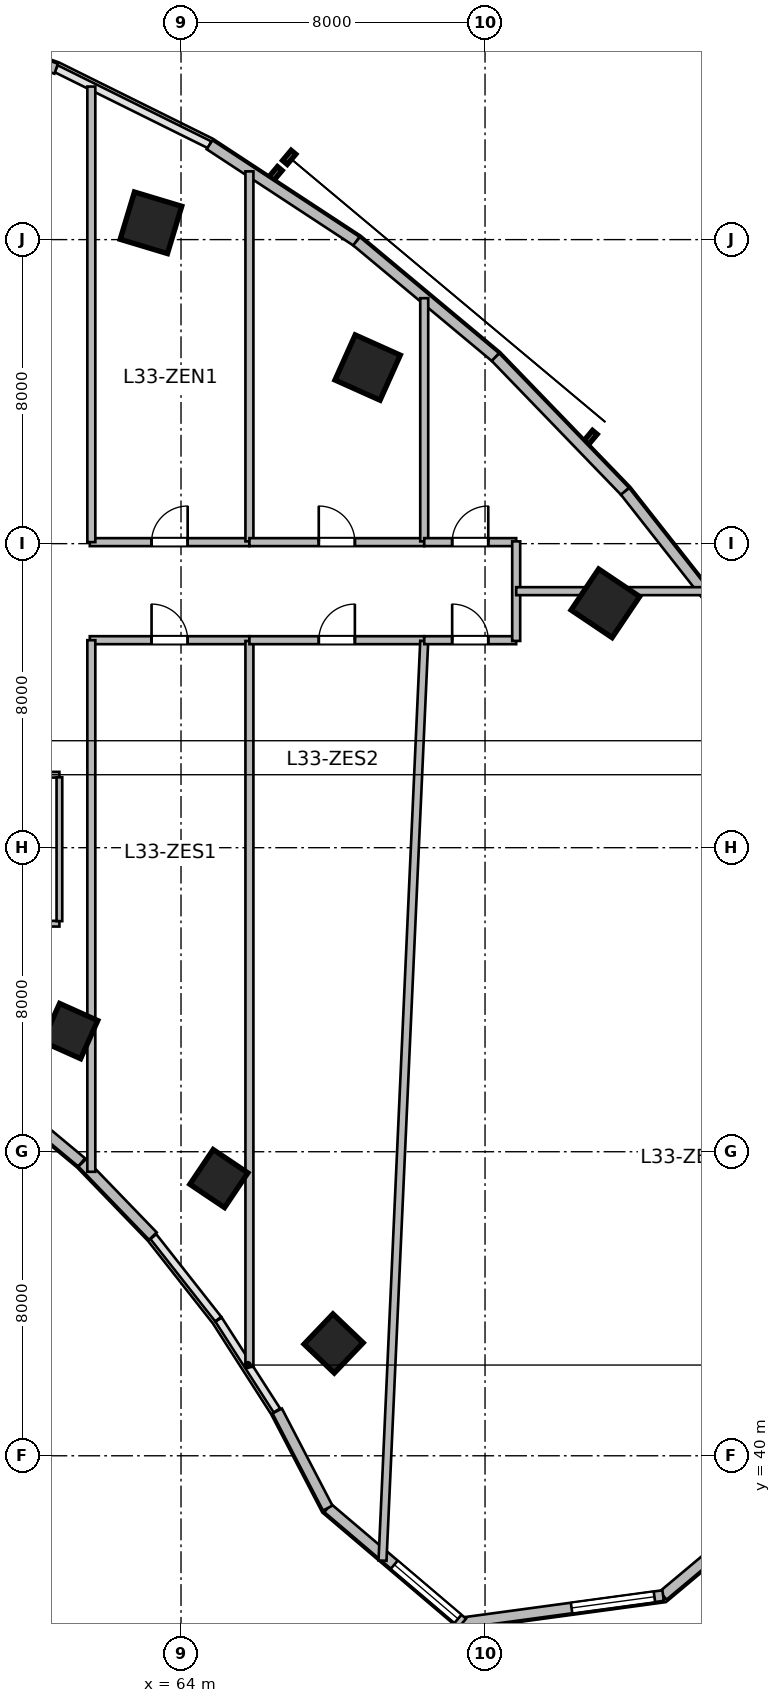
"""IFC4 building model, lengths in metres.
Left out: names, types, materials, properties, quantities, classifications, styles, units other than length and angle.
Written with IfcOpenShell. Run it as: python <this file> out.ifc"""

import sys

from ifc_helpers import new_model, si_unit, direction, frame, frame_2d, origin, origin_2d, place, context, subcontext, project, spatial, rectangle, extrude, source, transform, mapped, element, fill, save


model = new_model("IFC4")
c1 = context("Model", 3, precision=1e-05, world=origin(), true_north=direction((0.0, 1.0)))
c2 = subcontext(c1, "Body", "Model", "MODEL_VIEW")
j1 = project(units=[si_unit("LENGTHUNIT", "METRE"), si_unit("PLANEANGLEUNIT", "RADIAN")], contexts=[c1])
p1 = place(None, origin())
s1 = spatial("IfcSite", under=j1, at=p1, CompositionType="ELEMENT")
p2 = place(p1, origin())
s2 = spatial("IfcBuilding", under=s1, at=p2, CompositionType="ELEMENT")
p3 = place(p2, frame((0.0, 0.0, 138.9)))
s3 = spatial("IfcBuildingStorey", under=s2, at=p3, CompositionType="ELEMENT", Elevation=138.9)
m1 = source(origin(), c2, "Body", "SweptSolid", [
    extrude(rectangle(XDim=1.3, YDim=1.3, at=origin_2d()), origin(), (0.0, 0.0, 1.0), 3.9),
])
p4 = place(p3, frame((63.209, 72.442, 0.0), z_axis=(0.0, 0.0, 1.0), x_axis=(0.288697611798, 0.957420330337, 0.0)))
e1 = element("IfcColumn", 1, at=p4, inside=s3, PredefinedType="COLUMN", context=c2, shape_type="MappedRepresentation", body=[
    mapped(m1, transform((0.0, 0.0, 0.0), scale=1.0)),
])
m2 = source(origin(), c2, "Body", "SweptSolid", [
    extrude(rectangle(XDim=1.1, YDim=1.1, at=origin_2d()), origin(), (0.0, 0.0, 1.0), 3.9),
])
p5 = place(p3, frame((61.082, 51.175, 0.0), z_axis=(0.0, 0.0, 1.0), x_axis=(0.409126902895, 0.912477494148, 0.0)))
e2 = element("IfcColumn", 2, at=p5, inside=s3, PredefinedType="COLUMN", context=c2, shape_type="MappedRepresentation", body=[
    mapped(m2, transform((0.0, 0.0, 0.0), scale=1.0)),
])
p6 = place(p3, frame((68.91, 68.633, 0.0), z_axis=(0.0, 0.0, 1.0), x_axis=(0.409126902895, 0.912477494148, 0.0)))
e3 = element("IfcColumn", 3, at=p6, inside=s3, PredefinedType="COLUMN", context=c2, shape_type="MappedRepresentation", body=[
    mapped(m1, transform((0.0, 0.0, 0.0), scale=1.0)),
])
p7 = place(p3, frame((64.996, 47.294, 0.0), z_axis=(0.0, 0.0, 1.0), x_axis=(0.55774510898, 0.830012285095, 0.0)))
e4 = element("IfcColumn", 4, at=p7, inside=s3, PredefinedType="COLUMN", context=c2, shape_type="MappedRepresentation", body=[
    mapped(m2, transform((0.0, 0.0, 0.0), scale=1.0)),
])
p8 = place(p3, frame((75.167, 62.43, 0.0), z_axis=(0.0, 0.0, 1.0), x_axis=(0.55774510898, 0.830012285095, 0.0)))
e5 = element("IfcColumn", 5, at=p8, inside=s3, PredefinedType="COLUMN", context=c2, shape_type="MappedRepresentation", body=[
    mapped(m1, transform((0.0, 0.0, 0.0), scale=1.0)),
])
p9 = place(p3, frame((68.015, 42.955, 0.0), z_axis=(0.0, 0.0, 1.0), x_axis=(0.690756218984, 0.723087716626, 0.0)))
e6 = element("IfcColumn", 6, at=p9, inside=s3, PredefinedType="COLUMN", context=c2, shape_type="MappedRepresentation", body=[
    mapped(m2, transform((0.0, 0.0, 0.0), scale=1.0)),
])
m3 = source(origin(), c2, "Body", "SweptSolid", [
    extrude(rectangle(XDim=6.573, YDim=0.28, at=frame_2d((3.287, 0.0))), origin(), (0.0, 0.0, 1.0), 3.65),
])
p10 = place(p3, frame((81.725, 40.541, 0.0), z_axis=(0.0, 0.0, 1.0), x_axis=(-0.766715154163, -0.641987439423, 0.0)))
e7 = element("IfcWall", 7, at=p10, inside=s3, PredefinedType="SOLIDWALL", context=c2, shape_type="MappedRepresentation", body=[
    mapped(m3, transform((0.0, 0.0, 0.0), scale=1.0)),
])
p11 = place(p10, frame((0.543, 0.0, 0.95)))
e8 = element("IfcOpeningElement", 8, at=p11, cuts=e7, PredefinedType="OPENING", context=c2, shape_type="SweptSolid", body=[
    extrude(rectangle(XDim=2.2, YDim=2.1, at=frame_2d((1.1, 1.05))), frame((0.0, 0.15, 0.0), z_axis=(0.0, -1.0, 0.0), x_axis=(1.0, 0.0, 0.0)), (0.0, 0.0, 1.0), 0.3),
])
m4 = source(origin(), c2, "Body", "SweptSolid", [
    extrude(rectangle(XDim=5.324, YDim=0.28, at=frame_2d((2.662, 0.0))), origin(), (0.0, 0.0, 1.0), 3.65),
])
p12 = place(p3, frame((76.686, 36.322, 0.0), z_axis=(0.0, 0.0, 1.0), x_axis=(-0.990931467223, -0.134368252451, 0.0)))
e9 = element("IfcWall", 9, at=p12, inside=s3, PredefinedType="SOLIDWALL", context=c2, shape_type="MappedRepresentation", body=[
    mapped(m4, transform((0.0, 0.0, 0.0), scale=1.0)),
])
p13 = place(p12, frame((0.231, 0.0, 0.95)))
e10 = element("IfcOpeningElement", 10, at=p13, cuts=e9, PredefinedType="OPENING", context=c2, shape_type="SweptSolid", body=[
    extrude(rectangle(XDim=2.2, YDim=2.1, at=frame_2d((1.1, 1.05))), frame((0.0, 0.15, 0.0), z_axis=(0.0, -1.0, 0.0), x_axis=(1.0, 0.0, 0.0)), (0.0, 0.0, 1.0), 0.3),
])
m5 = source(origin(), c2, "Body", "SweptSolid", [
    extrude(rectangle(XDim=4.659, YDim=0.28, at=frame_2d((2.33, 0.0))), origin(), (0.0, 0.0, 1.0), 3.65),
])
p14 = place(p3, frame((71.41, 35.606, 0.0), z_axis=(0.0, 0.0, 1.0), x_axis=(-0.761913458795, 0.647678841176, 0.0)))
e11 = element("IfcWall", 11, at=p14, inside=s3, PredefinedType="SOLIDWALL", context=c2, shape_type="MappedRepresentation", body=[
    mapped(m5, transform((0.0, 0.0, 0.0), scale=1.0)),
])
p15 = place(p14, frame((0.16, 0.0, 0.95)))
e12 = element("IfcOpeningElement", 12, at=p15, cuts=e11, PredefinedType="OPENING", context=c2, shape_type="SweptSolid", body=[
    extrude(rectangle(XDim=2.2, YDim=2.1, at=frame_2d((1.1, 1.05))), frame((0.0, 0.15, 0.0), z_axis=(0.0, -1.0, 0.0), x_axis=(1.0, 0.0, 0.0)), (0.0, 0.0, 1.0), 0.3),
])
m6 = source(origin(), c2, "Body", "SweptSolid", [
    extrude(rectangle(XDim=2.88, YDim=0.28, at=frame_2d((1.44, 0.0))), origin(), (0.0, 0.0, 1.0), 3.65),
])
p16 = place(p3, frame((67.861, 38.624, 0.0), z_axis=(0.0, 0.0, 1.0), x_axis=(-0.461769086658, 0.887000175088, 0.0)))
e13 = element("IfcWall", 13, at=p16, inside=s3, PredefinedType="SOLIDWALL", context=c2, shape_type="MappedRepresentation", body=[
    mapped(m6, transform((0.0, 0.0, 0.0), scale=1.0)),
])
m7 = source(origin(), c2, "Body", "SweptSolid", [
    extrude(rectangle(XDim=2.68, YDim=0.28, at=frame_2d((1.34, 0.0))), origin(), (0.0, 0.0, 1.0), 3.65),
])
p17 = place(p3, frame((63.26, 45.78, 0.0), z_axis=(0.0, 0.0, 1.0), x_axis=(-0.694561996568, 0.719432855049, 0.0)))
e14 = element("IfcWall", 14, at=p17, inside=s3, PredefinedType="SOLIDWALL", context=c2, shape_type="MappedRepresentation", body=[
    mapped(m7, transform((0.0, 0.0, 0.0), scale=1.0)),
])
m8 = source(origin(), c2, "Body", "SweptSolid", [
    extrude(rectangle(XDim=2.601, YDim=0.28, at=frame_2d((1.3, 0.0))), origin(), (0.0, 0.0, 1.0), 3.65),
])
p18 = place(p3, frame((61.385, 47.721, 0.0), z_axis=(0.0, 0.0, 1.0), x_axis=(-0.76796730295, 0.640489048775, 0.0)))
e15 = element("IfcWall", 15, at=p18, inside=s3, PredefinedType="SOLIDWALL", context=c2, shape_type="MappedRepresentation", body=[
    mapped(m8, transform((0.0, 0.0, 0.0), scale=1.0)),
])
m9 = source(origin(), c2, "Body", "SweptSolid", [
    extrude(rectangle(XDim=4.409, YDim=0.28, at=frame_2d((2.205, 0.0))), origin(), (0.0, 0.0, 1.0), 3.65),
])
p19 = place(p3, frame((56.548, 77.941, 0.0), z_axis=(0.0, 0.0, 1.0), x_axis=(0.944879374121, -0.327418643881, 0.0)))
e16 = element("IfcWall", 16, at=p19, inside=s3, PredefinedType="SOLIDWALL", context=c2, shape_type="MappedRepresentation", body=[
    mapped(m9, transform((0.0, 0.0, 0.0), scale=1.0)),
])
m10 = source(origin(), c2, "Body", "SweptSolid", [
    extrude(rectangle(XDim=4.626, YDim=0.28, at=frame_2d((2.313, 0.0))), origin(), (0.0, 0.0, 1.0), 3.65),
])
p20 = place(p3, frame((64.751, 74.496, 0.0), z_axis=(0.0, 0.0, 1.0), x_axis=(0.83595938331, -0.548791316855, 0.0)))
e17 = element("IfcWall", 17, at=p20, inside=s3, PredefinedType="SOLIDWALL", context=c2, shape_type="MappedRepresentation", body=[
    mapped(m10, transform((0.0, 0.0, 0.0), scale=1.0)),
])
m11 = source(origin(), c2, "Body", "SweptSolid", [
    extrude(rectangle(XDim=4.762, YDim=0.28, at=frame_2d((2.381, 0.0))), origin(), (0.0, 0.0, 1.0), 3.65),
])
p21 = place(p3, frame((68.618, 71.958, 0.0), z_axis=(0.0, 0.0, 1.0), x_axis=(0.767952279762, -0.640507061638, 0.0)))
e18 = element("IfcWall", 18, at=p21, inside=s3, PredefinedType="SOLIDWALL", context=c2, shape_type="MappedRepresentation", body=[
    mapped(m11, transform((0.0, 0.0, 0.0), scale=1.0)),
])
m12 = source(origin(), c2, "Body", "SweptSolid", [
    extrude(rectangle(XDim=4.908, YDim=0.28, at=frame_2d((2.454, 0.0))), origin(), (0.0, 0.0, 1.0), 3.65),
])
p22 = place(p3, frame((72.275, 68.907, 0.0), z_axis=(0.0, 0.0, 1.0), x_axis=(0.694613154328, -0.719383462302, 0.0)))
e19 = element("IfcWall", 19, at=p22, inside=s3, PredefinedType="SOLIDWALL", context=c2, shape_type="MappedRepresentation", body=[
    mapped(m12, transform((0.0, 0.0, 0.0), scale=1.0)),
])
m13 = source(origin(), c2, "Body", "SweptSolid", [
    extrude(rectangle(XDim=5.058, YDim=0.28, at=frame_2d((2.529, 0.0))), origin(), (0.0, 0.0, 1.0), 3.65),
])
p23 = place(p3, frame((75.685, 65.376, 0.0), z_axis=(0.0, 0.0, 1.0), x_axis=(0.618145507434, -0.786063694391, 0.0)))
e20 = element("IfcWall", 20, at=p23, inside=s3, PredefinedType="SOLIDWALL", context=c2, shape_type="MappedRepresentation", body=[
    mapped(m13, transform((0.0, 0.0, 0.0), scale=1.0)),
])
m14 = source(origin(), c2, "Body", "SweptSolid", [
    extrude(rectangle(XDim=6.6, YDim=0.15, at=frame_2d((3.3, 0.0))), origin(), (0.0, 0.0, 1.0), 3.095),
])
p24 = place(p3, frame((54.2, 54.0, 0.0), z_axis=(0.0, 0.0, 1.0), x_axis=(1.0, 0.0, 0.0)))
e21 = element("IfcWall", 21, at=p24, inside=s3, PredefinedType="PARTITIONING", context=c2, shape_type="MappedRepresentation", body=[
    mapped(m14, transform((0.0, 0.0, 0.0), scale=1.0)),
])
m15 = source(origin(), c2, "Body", "SweptSolid", [
    extrude(rectangle(XDim=6.6, YDim=0.15, at=frame_2d((3.3, 0.0))), origin(), (0.0, 0.0, 1.0), 3.65),
])
p25 = place(p3, frame((54.2, 57.92, 0.0), z_axis=(0.0, 0.0, 1.0), x_axis=(1.0, 0.0, 0.0)))
e22 = element("IfcWall", 22, at=p25, inside=s3, PredefinedType="PARTITIONING", context=c2, shape_type="MappedRepresentation", body=[
    mapped(m15, transform((0.0, 0.0, 0.0), scale=1.0)),
])
p26 = place(p25, frame((2.825, 0.0, 0.0)))
e23 = element("IfcOpeningElement", 23, at=p26, cuts=e22, PredefinedType="OPENING", context=c2, shape_type="SweptSolid", body=[
    extrude(rectangle(XDim=0.95, YDim=2.1, at=frame_2d((0.475, 1.05))), frame((0.0, 0.085, 0.0), z_axis=(0.0, -1.0, 0.0), x_axis=(1.0, 0.0, 0.0)), (0.0, 0.0, 1.0), 0.17),
])
m16 = source(origin(), c2, "Body", "SweptSolid", [
    extrude(rectangle(XDim=3.785, YDim=0.15, at=frame_2d((1.893, 0.0))), origin(), (0.0, 0.0, 1.0), 3.65),
])
p27 = place(p3, frame((60.8, 54.067, 0.0), z_axis=(0.0, 0.0, 1.0), x_axis=(0.0, 1.0, 0.0)))
e24 = element("IfcWall", 24, at=p27, inside=s3, PredefinedType="PARTITIONING", context=c2, shape_type="MappedRepresentation", body=[
    mapped(m16, transform((0.0, 0.0, 0.0), scale=1.0)),
])
m17 = source(origin(), c2, "Body", "SweptSolid", [
    extrude(rectangle(XDim=4.2, YDim=0.21, at=frame_2d((2.1, 0.0))), origin(), (0.0, 0.0, 1.0), 3.65),
])
p28 = place(p3, frame((61.6, 64.04, 0.0), z_axis=(0.0, 0.0, 1.0), x_axis=(1.0, 0.0, 0.0)))
e25 = element("IfcWall", 25, at=p28, inside=s3, PredefinedType="PARTITIONING", context=c2, shape_type="MappedRepresentation", body=[
    mapped(m17, transform((0.0, 0.0, 0.0), scale=1.0)),
])
p29 = place(p28, frame((1.625, 0.0, 0.0)))
e26 = element("IfcOpeningElement", 26, at=p29, cuts=e25, PredefinedType="OPENING", context=c2, shape_type="SweptSolid", body=[
    extrude(rectangle(XDim=0.95, YDim=2.1, at=frame_2d((0.475, 1.05))), frame((0.0, 0.115, 0.0), z_axis=(0.0, -1.0, 0.0), x_axis=(1.0, 0.0, 0.0)), (0.0, 0.0, 1.0), 0.23),
])
m18 = source(origin(), c2, "Body", "SweptSolid", [
    extrude(rectangle(XDim=9.736, YDim=0.21, at=frame_2d((4.868, 0.0))), origin(), (0.0, 0.0, 1.0), 3.65),
])
p30 = place(p3, frame((65.8, 64.06, 0.0), z_axis=(0.0, 0.0, 1.0), x_axis=(0.0, 1.0, 0.0)))
e27 = element("IfcWall", 27, at=p30, inside=s3, PredefinedType="PARTITIONING", context=c2, shape_type="MappedRepresentation", body=[
    mapped(m18, transform((0.0, 0.0, 0.0), scale=1.0)),
])
m19 = source(origin(), c2, "Body", "SweptSolid", [
    extrude(rectangle(XDim=4.6, YDim=0.21, at=frame_2d((2.3, 0.0))), origin(), (0.0, 0.0, 1.0), 3.65),
])
p31 = place(p3, frame((65.8, 64.04, 0.0), z_axis=(0.0, 0.0, 1.0), x_axis=(1.0, 0.0, 0.0)))
e28 = element("IfcWall", 28, at=p31, inside=s3, PredefinedType="PARTITIONING", context=c2, shape_type="MappedRepresentation", body=[
    mapped(m19, transform((0.0, 0.0, 0.0), scale=1.0)),
])
p32 = place(p31, frame((1.825, 0.0, 0.0)))
e29 = element("IfcOpeningElement", 29, at=p32, cuts=e28, PredefinedType="OPENING", context=c2, shape_type="SweptSolid", body=[
    extrude(rectangle(XDim=0.95, YDim=2.1, at=frame_2d((0.475, 1.05))), frame((0.0, 0.115, 0.0), z_axis=(0.0, -1.0, 0.0), x_axis=(1.0, 0.0, 0.0)), (0.0, 0.0, 1.0), 0.23),
])
m20 = source(origin(), c2, "Body", "SweptSolid", [
    extrude(rectangle(XDim=6.398, YDim=0.21, at=frame_2d((3.199, 0.0))), origin(), (0.0, 0.0, 1.0), 3.65),
])
p33 = place(p3, frame((70.4, 64.06, 0.0), z_axis=(0.0, 0.0, 1.0), x_axis=(0.0, 1.0, 0.0)))
e30 = element("IfcWall", 30, at=p33, inside=s3, PredefinedType="PARTITIONING", context=c2, shape_type="MappedRepresentation", body=[
    mapped(m20, transform((0.0, 0.0, 0.0), scale=1.0)),
])
m21 = source(origin(), c2, "Body", "SweptSolid", [
    extrude(rectangle(XDim=2.42, YDim=0.21, at=frame_2d((1.21, 0.0))), origin(), (0.0, 0.0, 1.0), 3.65),
])
p34 = place(p3, frame((70.4, 64.04, 0.0), z_axis=(0.0, 0.0, 1.0), x_axis=(1.0, 0.0, 0.0)))
e31 = element("IfcWall", 31, at=p34, inside=s3, PredefinedType="PARTITIONING", context=c2, shape_type="MappedRepresentation", body=[
    mapped(m21, transform((0.0, 0.0, 0.0), scale=1.0)),
])
p35 = place(p34, frame((0.735, 0.0, 0.0)))
e32 = element("IfcOpeningElement", 32, at=p35, cuts=e31, PredefinedType="OPENING", context=c2, shape_type="SweptSolid", body=[
    extrude(rectangle(XDim=0.95, YDim=2.1, at=frame_2d((0.475, 1.05))), frame((0.0, 0.115, 0.0), z_axis=(0.0, -1.0, 0.0), x_axis=(1.0, 0.0, 0.0)), (0.0, 0.0, 1.0), 0.23),
])
p36 = place(p3, frame((61.6, 61.46, 0.0), z_axis=(0.0, 0.0, 1.0), x_axis=(1.0, 0.0, 0.0)))
e33 = element("IfcWall", 33, at=p36, inside=s3, PredefinedType="PARTITIONING", context=c2, shape_type="MappedRepresentation", body=[
    mapped(m17, transform((0.0, 0.0, 0.0), scale=1.0)),
])
p37 = place(p36, frame((1.625, 0.0, 0.0)))
e34 = element("IfcOpeningElement", 34, at=p37, cuts=e33, PredefinedType="OPENING", context=c2, shape_type="SweptSolid", body=[
    extrude(rectangle(XDim=0.95, YDim=2.1, at=frame_2d((0.475, 1.05))), frame((0.0, 0.115, 0.0), z_axis=(0.0, -1.0, 0.0), x_axis=(1.0, 0.0, 0.0)), (0.0, 0.0, 1.0), 0.23),
])
m22 = source(origin(), c2, "Body", "SweptSolid", [
    extrude(rectangle(XDim=19.103, YDim=0.21, at=frame_2d((9.552, 0.0))), origin(), (0.0, 0.0, 1.0), 2.942),
])
p38 = place(p3, frame((65.8, 42.337, 0.0), z_axis=(0.0, 0.0, 1.0), x_axis=(0.0, 1.0, 0.0)))
e35 = element("IfcWall", 35, at=p38, inside=s3, PredefinedType="PARTITIONING", context=c2, shape_type="MappedRepresentation", body=[
    mapped(m22, transform((0.0, 0.0, 0.0), scale=1.0)),
])
p39 = place(p3, frame((65.8, 61.46, 0.0), z_axis=(0.0, 0.0, 1.0), x_axis=(1.0, 0.0, 0.0)))
e36 = element("IfcWall", 36, at=p39, inside=s3, PredefinedType="PARTITIONING", context=c2, shape_type="MappedRepresentation", body=[
    mapped(m19, transform((0.0, 0.0, 0.0), scale=1.0)),
])
p40 = place(p39, frame((1.825, 0.0, 0.0)))
e37 = element("IfcOpeningElement", 37, at=p40, cuts=e36, PredefinedType="OPENING", context=c2, shape_type="SweptSolid", body=[
    extrude(rectangle(XDim=0.95, YDim=2.1, at=frame_2d((0.475, 1.05))), frame((0.0, 0.115, 0.0), z_axis=(0.0, -1.0, 0.0), x_axis=(1.0, 0.0, 0.0)), (0.0, 0.0, 1.0), 0.23),
])
m23 = source(origin(), c2, "Body", "SweptSolid", [
    extrude(rectangle(XDim=24.224, YDim=0.21, at=frame_2d((12.112, 0.0))), origin(), (0.0, 0.0, 1.0), 2.942),
])
p41 = place(p3, frame((69.302, 37.241, 0.0), z_axis=(0.0, 0.0, 1.0), x_axis=(0.045312570313, 0.998972857975, 0.0)))
e38 = element("IfcWall", 38, at=p41, inside=s3, PredefinedType="PARTITIONING", context=c2, shape_type="MappedRepresentation", body=[
    mapped(m23, transform((0.0, 0.0, 0.0), scale=1.0)),
])
p42 = place(p3, frame((70.4, 61.46, 0.0), z_axis=(0.0, 0.0, 1.0), x_axis=(1.0, 0.0, 0.0)))
e39 = element("IfcWall", 39, at=p42, inside=s3, PredefinedType="PARTITIONING", context=c2, shape_type="MappedRepresentation", body=[
    mapped(m21, transform((0.0, 0.0, 0.0), scale=1.0)),
])
p43 = place(p42, frame((0.735, 0.0, 0.0)))
e40 = element("IfcOpeningElement", 40, at=p43, cuts=e39, PredefinedType="OPENING", context=c2, shape_type="SweptSolid", body=[
    extrude(rectangle(XDim=0.95, YDim=2.1, at=frame_2d((0.475, 1.05))), frame((0.0, 0.115, 0.0), z_axis=(0.0, -1.0, 0.0), x_axis=(1.0, 0.0, 0.0)), (0.0, 0.0, 1.0), 0.23),
])
m24 = source(origin(), c2, "Body", "SweptSolid", [
    extrude(rectangle(XDim=13.988, YDim=0.21, at=frame_2d((6.994, 0.0))), origin(), (0.0, 0.0, 1.0), 2.942),
])
p44 = place(p3, frame((61.64, 47.472, 0.0), z_axis=(0.0, 0.0, 1.0), x_axis=(0.0, 1.0, 0.0)))
e41 = element("IfcWall", 41, at=p44, inside=s3, PredefinedType="PARTITIONING", context=c2, shape_type="MappedRepresentation", body=[
    mapped(m24, transform((0.0, 0.0, 0.0), scale=1.0)),
])
m25 = source(origin(), c2, "Body", "SweptSolid", [
    extrude(rectangle(XDim=11.987, YDim=0.21, at=frame_2d((5.994, 0.0))), origin(), (0.0, 0.0, 1.0), 3.65),
])
p45 = place(p3, frame((61.64, 64.04, 0.0), z_axis=(0.0, 0.0, 1.0), x_axis=(0.0, 1.0, 0.0)))
e42 = element("IfcWall", 42, at=p45, inside=s3, PredefinedType="PARTITIONING", context=c2, shape_type="MappedRepresentation", body=[
    mapped(m25, transform((0.0, 0.0, 0.0), scale=1.0)),
])
m26 = source(origin(), c2, "Body", "SweptSolid", [
    extrude(rectangle(XDim=2.62, YDim=0.21, at=frame_2d((1.31, 0.0))), origin(), (0.0, 0.0, 1.0), 3.28),
])
p46 = place(p3, frame((72.82, 61.44, 0.0), z_axis=(0.0, 0.0, 1.0), x_axis=(0.0, 1.0, 0.0)))
e43 = element("IfcWall", 43, at=p46, inside=s3, PredefinedType="PARTITIONING", context=c2, shape_type="MappedRepresentation", body=[
    mapped(m26, transform((0.0, 0.0, 0.0), scale=1.0)),
])
m27 = source(origin(), c2, "Body", "SweptSolid", [
    extrude(rectangle(XDim=4.917, YDim=0.21, at=frame_2d((2.459, 0.0))), origin(), (0.0, 0.0, 1.0), 3.65),
])
p47 = place(p3, frame((72.82, 62.75, 0.0), z_axis=(0.0, 0.0, 1.0), x_axis=(1.0, 0.0, 0.0)))
e44 = element("IfcWall", 44, at=p47, inside=s3, PredefinedType="PARTITIONING", context=c2, shape_type="MappedRepresentation", body=[
    mapped(m27, transform((0.0, 0.0, 0.0), scale=1.0)),
])
m28 = source(origin(), c2, "Body", "SweptSolid", [
    extrude(rectangle(XDim=2.2, YDim=2.1, at=frame_2d((1.1, 1.05))), frame((0.0, 0.03, 0.0), z_axis=(0.0, -1.0, 0.0), x_axis=(1.0, 0.0, 0.0)), (0.0, 0.0, 1.0), 0.06),
])
p48 = place(p13, origin())
e45 = element("IfcWindow", 45, at=p48, inside=s3, PartitioningType="TRIPLE_PANEL_VERTICAL", PredefinedType="WINDOW", context=c2, shape_type="MappedRepresentation", body=[
    mapped(m28, transform((0.0, 0.0, 0.0), scale=1.0)),
])
fill(e10, e45)
p49 = place(p15, origin())
e46 = element("IfcWindow", 46, at=p49, inside=s3, PartitioningType="TRIPLE_PANEL_VERTICAL", PredefinedType="WINDOW", context=c2, shape_type="MappedRepresentation", body=[
    mapped(m28, transform((0.0, 0.0, 0.0), scale=1.0)),
])
fill(e12, e46)
m29 = source(origin(), c2, "Body", "SweptSolid", [
    extrude(rectangle(XDim=0.95, YDim=2.1, at=frame_2d((0.475, 1.05))), frame((0.0, 0.025, 0.0), z_axis=(0.0, -1.0, 0.0), x_axis=(1.0, 0.0, 0.0)), (0.0, 0.0, 1.0), 0.05),
])
p50 = place(p29, origin())
e47 = element("IfcDoor", 47, at=p50, inside=s3, OperationType="SINGLE_SWING_RIGHT", PredefinedType="DOOR", context=c2, shape_type="MappedRepresentation", body=[
    mapped(m29, transform((0.0, 0.0, 0.0), scale=1.0)),
])
fill(e26, e47)
p51 = place(p32, origin())
e48 = element("IfcDoor", 48, at=p51, inside=s3, OperationType="SINGLE_SWING_LEFT", PredefinedType="DOOR", context=c2, shape_type="MappedRepresentation", body=[
    mapped(m29, transform((0.0, 0.0, 0.0), scale=1.0)),
])
fill(e29, e48)
p52 = place(p35, origin())
e49 = element("IfcDoor", 49, at=p52, inside=s3, OperationType="SINGLE_SWING_RIGHT", PredefinedType="DOOR", context=c2, shape_type="MappedRepresentation", body=[
    mapped(m29, transform((0.0, 0.0, 0.0), scale=1.0)),
])
fill(e32, e49)
p53 = place(p37, origin())
e50 = element("IfcDoor", 50, at=p53, inside=s3, OperationType="SINGLE_SWING_LEFT", PredefinedType="DOOR", context=c2, shape_type="MappedRepresentation", body=[
    mapped(m29, transform((0.0, 0.0, 0.0), scale=1.0)),
])
fill(e34, e50)
p54 = place(p40, origin())
e51 = element("IfcDoor", 51, at=p54, inside=s3, OperationType="SINGLE_SWING_RIGHT", PredefinedType="DOOR", context=c2, shape_type="MappedRepresentation", body=[
    mapped(m29, transform((0.0, 0.0, 0.0), scale=1.0)),
])
fill(e37, e51)
p55 = place(p43, origin())
e52 = element("IfcDoor", 52, at=p55, inside=s3, OperationType="SINGLE_SWING_LEFT", PredefinedType="DOOR", context=c2, shape_type="MappedRepresentation", body=[
    mapped(m29, transform((0.0, 0.0, 0.0), scale=1.0)),
])
fill(e40, e52)
save(model, sys.argv[1])
